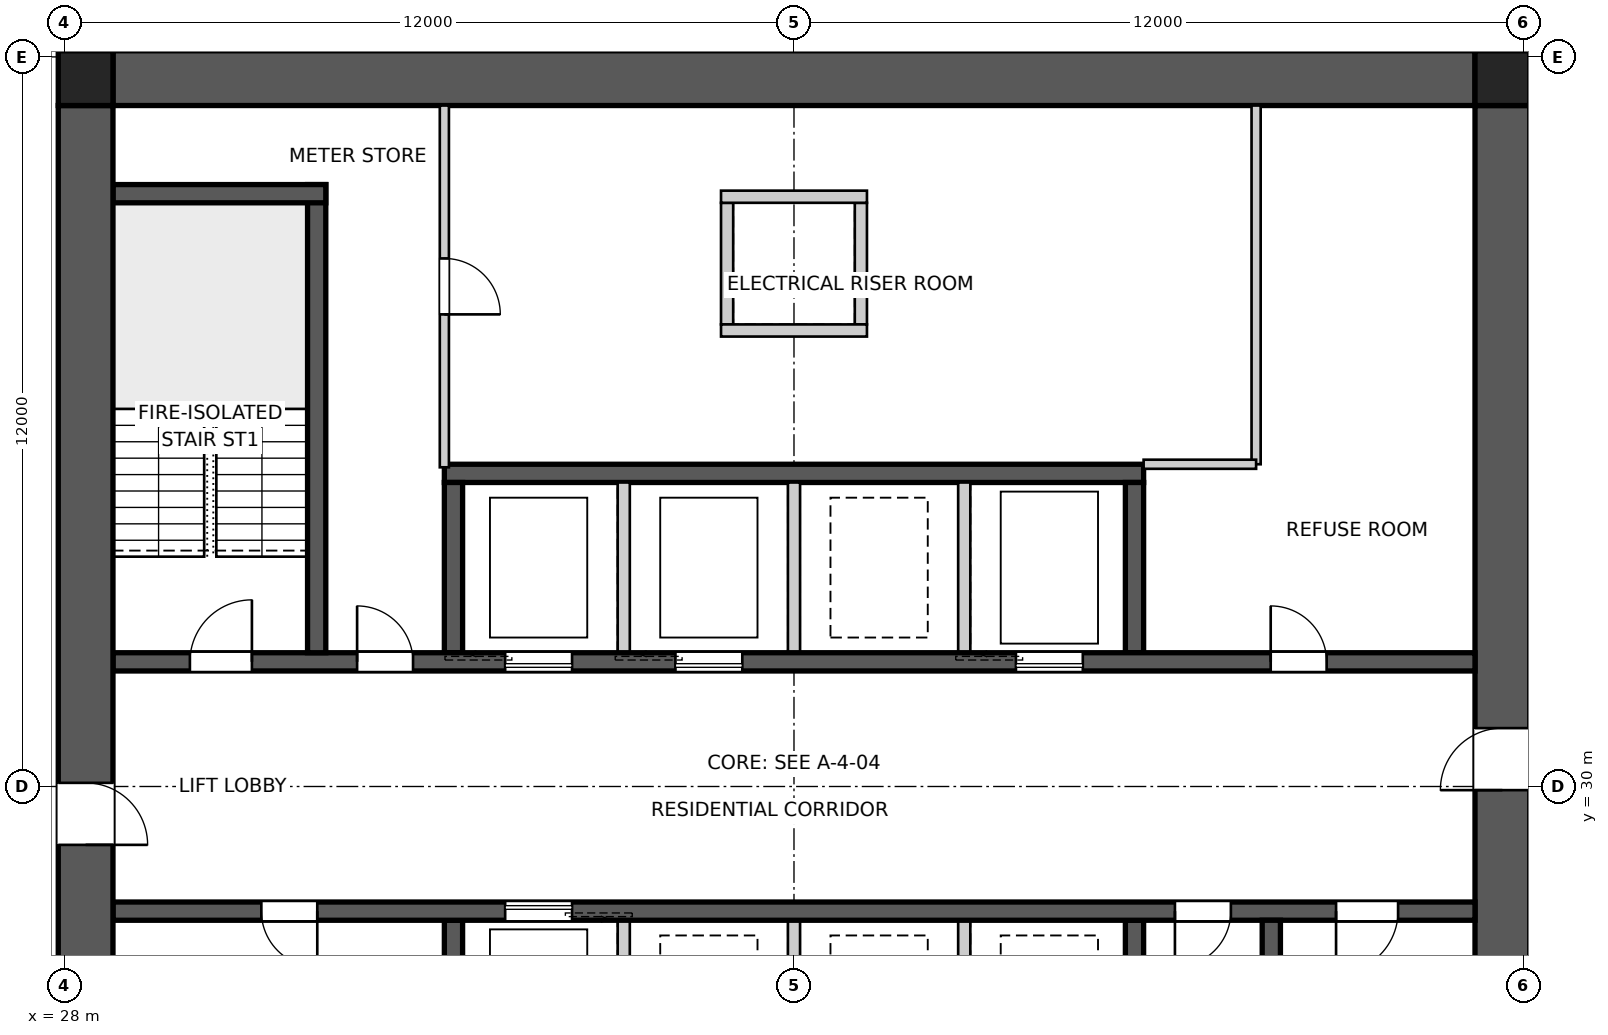
"""IFC4 building model, lengths in metres.
Left out: names, types, materials, properties, quantities, classifications, styles, units other than length and angle.
Written with IfcOpenShell. Run it as: python <this file> out.ifc"""

import sys

from ifc_helpers import new_model, si_unit, direction, frame, frame_2d, origin, origin_2d, place, context, subcontext, project, spatial, polyline, rectangle, outline, extrude, element, fill, save


model = new_model("IFC4")
c1 = context("Model", 3, precision=1e-05, world=origin(), true_north=direction((0.0, 1.0)))
c2 = subcontext(c1, "Body", "Model", "MODEL_VIEW")
j1 = project(units=[si_unit("LENGTHUNIT", "METRE"), si_unit("PLANEANGLEUNIT", "RADIAN")], contexts=[c1])
p1 = place(None, origin())
s1 = spatial("IfcSite", under=j1, at=p1, CompositionType="ELEMENT")
p2 = place(p1, origin())
s2 = spatial("IfcBuilding", under=s1, at=p2, CompositionType="ELEMENT")
p3 = place(p2, frame((0.0, 0.0, 47.2)))
s3 = spatial("IfcBuildingStorey", under=s2, at=p3, CompositionType="ELEMENT", Elevation=47.2)
p4 = place(p3, frame((28.8, 41.65, 0.0), z_axis=(0.0, 0.0, 1.0), x_axis=(1.0, 0.0, 0.0)))
e1 = element("IfcWall", 1, at=p4, inside=s3, PredefinedType="SHEAR", context=c2, shape_type="SweptSolid", body=[
    extrude(outline(polyline([(0.0, -0.45), (22.4, -0.45), (22.4, -0.025), (22.85, -0.025), (22.85, 0.025), (22.4, 0.025), (22.4, 0.45), (0.0, 0.45), (0.0, 0.025), (-0.45, 0.025), (-0.45, -0.025), (0.0, -0.025), (0.0, -0.45)])), origin(), (0.0, 0.0, 1.0), 3.4),
])
p5 = place(p3, frame((51.65, 18.8, 0.0), z_axis=(0.0, 0.0, 1.0), x_axis=(0.0, 1.0, 0.0)))
e2 = element("IfcWall", 2, at=p5, inside=s3, PredefinedType="SHEAR", context=c2, shape_type="SweptSolid", body=[
    extrude(outline(polyline([(0.0, -0.45), (22.4, -0.45), (22.4, -0.025), (22.85, -0.025), (22.85, 0.025), (22.4, 0.025), (22.4, 0.45), (0.0, 0.45), (0.0, 0.025), (-0.45, 0.025), (-0.45, -0.025), (0.0, -0.025), (0.0, -0.45)])), origin(), (0.0, 0.0, 1.0), 3.4),
])
p6 = place(p5, frame((11.14, 0.0, 0.0)))
e3 = element("IfcOpeningElement", 3, at=p6, cuts=e2, PredefinedType="OPENING", context=c2, shape_type="SweptSolid", body=[
    extrude(rectangle(XDim=1.02, YDim=2.4, at=frame_2d((0.51, 1.2))), frame((0.0, 0.46, 0.0), z_axis=(0.0, -1.0, 0.0), x_axis=(1.0, 0.0, 0.0)), (0.0, 0.0, 1.0), 0.92),
])
p7 = place(p3, frame((28.35, 41.2, 0.0), z_axis=(0.0, 0.0, 1.0), x_axis=(0.0, -1.0, 0.0)))
e4 = element("IfcWall", 4, at=p7, inside=s3, PredefinedType="SHEAR", context=c2, shape_type="SweptSolid", body=[
    extrude(outline(polyline([(0.0, -0.45), (22.4, -0.45), (22.4, -0.025), (22.85, -0.025), (22.85, 0.025), (22.4, 0.025), (22.4, 0.45), (0.0, 0.45), (0.0, 0.025), (-0.45, 0.025), (-0.45, -0.025), (0.0, -0.025), (0.0, -0.45)])), origin(), (0.0, 0.0, 1.0), 3.4),
])
p8 = place(p7, frame((11.14, 0.0, 0.0)))
e5 = element("IfcOpeningElement", 5, at=p8, cuts=e4, PredefinedType="OPENING", context=c2, shape_type="SweptSolid", body=[
    extrude(rectangle(XDim=1.02, YDim=2.4, at=frame_2d((0.51, 1.2))), frame((0.0, 0.46, 0.0), z_axis=(0.0, -1.0, 0.0), x_axis=(1.0, 0.0, 0.0)), (0.0, 0.0, 1.0), 0.92),
])
p9 = place(p3, frame((28.8, 32.05, 0.0), z_axis=(0.0, 0.0, 1.0), x_axis=(1.0, 0.0, 0.0)))
e6 = element("IfcWall", 6, at=p9, inside=s3, PredefinedType="SHEAR", context=c2, shape_type="SweptSolid", body=[
    extrude(rectangle(XDim=22.4, YDim=0.3, at=frame_2d((11.2, 0.0))), origin(), (0.0, 0.0, 1.0), 3.4),
])
p10 = place(p9, frame((19.04, 0.0, 0.0)))
e7 = element("IfcOpeningElement", 7, at=p10, cuts=e6, PredefinedType="OPENING", context=c2, shape_type="SweptSolid", body=[
    extrude(rectangle(XDim=0.92, YDim=2.1, at=frame_2d((0.46, 1.05))), frame((0.0, 0.16, 0.0), z_axis=(0.0, -1.0, 0.0), x_axis=(1.0, 0.0, 0.0)), (0.0, 0.0, 1.0), 0.32),
])
p11 = place(p9, frame((1.265, 0.0, 0.0)))
e8 = element("IfcOpeningElement", 8, at=p11, cuts=e6, PredefinedType="OPENING", context=c2, shape_type="SweptSolid", body=[
    extrude(rectangle(XDim=1.02, YDim=2.1, at=frame_2d((0.51, 1.05))), frame((0.0, 0.16, 0.0), z_axis=(0.0, -1.0, 0.0), x_axis=(1.0, 0.0, 0.0)), (0.0, 0.0, 1.0), 0.32),
])
p12 = place(p9, frame((4.015, 0.0, 0.0)))
e9 = element("IfcOpeningElement", 9, at=p12, cuts=e6, PredefinedType="OPENING", context=c2, shape_type="SweptSolid", body=[
    extrude(rectangle(XDim=0.92, YDim=2.1, at=frame_2d((0.46, 1.05))), frame((0.0, 0.16, 0.0), z_axis=(0.0, -1.0, 0.0), x_axis=(1.0, 0.0, 0.0)), (0.0, 0.0, 1.0), 0.32),
])
p13 = place(p9, frame((6.45, 0.0, 0.0)))
e10 = element("IfcOpeningElement", 10, at=p13, cuts=e6, PredefinedType="OPENING", context=c2, shape_type="SweptSolid", body=[
    extrude(rectangle(XDim=1.1, YDim=2.1, at=frame_2d((0.55, 1.05))), frame((0.0, 0.16, 0.0), z_axis=(0.0, -1.0, 0.0), x_axis=(1.0, 0.0, 0.0)), (0.0, 0.0, 1.0), 0.32),
])
p14 = place(p9, frame((9.25, 0.0, 0.0)))
e11 = element("IfcOpeningElement", 11, at=p14, cuts=e6, PredefinedType="OPENING", context=c2, shape_type="SweptSolid", body=[
    extrude(rectangle(XDim=1.1, YDim=2.1, at=frame_2d((0.55, 1.05))), frame((0.0, 0.16, 0.0), z_axis=(0.0, -1.0, 0.0), x_axis=(1.0, 0.0, 0.0)), (0.0, 0.0, 1.0), 0.32),
])
p15 = place(p9, frame((14.85, 0.0, 0.0)))
e12 = element("IfcOpeningElement", 12, at=p15, cuts=e6, PredefinedType="OPENING", context=c2, shape_type="SweptSolid", body=[
    extrude(rectangle(XDim=1.1, YDim=2.1, at=frame_2d((0.55, 1.05))), frame((0.0, 0.16, 0.0), z_axis=(0.0, -1.0, 0.0), x_axis=(1.0, 0.0, 0.0)), (0.0, 0.0, 1.0), 0.32),
])
p16 = place(p3, frame((51.2, 27.95, 0.0), z_axis=(0.0, 0.0, 1.0), x_axis=(-1.0, 0.0, 0.0)))
e13 = element("IfcWall", 13, at=p16, inside=s3, PredefinedType="SHEAR", context=c2, shape_type="SweptSolid", body=[
    extrude(rectangle(XDim=22.4, YDim=0.3, at=frame_2d((11.2, 0.0))), origin(), (0.0, 0.0, 1.0), 3.4),
])
p17 = place(p16, frame((19.04, 0.0, 0.0)))
e14 = element("IfcOpeningElement", 14, at=p17, cuts=e13, PredefinedType="OPENING", context=c2, shape_type="SweptSolid", body=[
    extrude(rectangle(XDim=0.92, YDim=2.1, at=frame_2d((0.46, 1.05))), frame((0.0, 0.16, 0.0), z_axis=(0.0, -1.0, 0.0), x_axis=(1.0, 0.0, 0.0)), (0.0, 0.0, 1.0), 0.32),
])
p18 = place(p16, frame((1.265, 0.0, 0.0)))
e15 = element("IfcOpeningElement", 15, at=p18, cuts=e13, PredefinedType="OPENING", context=c2, shape_type="SweptSolid", body=[
    extrude(rectangle(XDim=1.02, YDim=2.1, at=frame_2d((0.51, 1.05))), frame((0.0, 0.16, 0.0), z_axis=(0.0, -1.0, 0.0), x_axis=(1.0, 0.0, 0.0)), (0.0, 0.0, 1.0), 0.32),
])
p19 = place(p16, frame((4.015, 0.0, 0.0)))
e16 = element("IfcOpeningElement", 16, at=p19, cuts=e13, PredefinedType="OPENING", context=c2, shape_type="SweptSolid", body=[
    extrude(rectangle(XDim=0.92, YDim=2.1, at=frame_2d((0.46, 1.05))), frame((0.0, 0.16, 0.0), z_axis=(0.0, -1.0, 0.0), x_axis=(1.0, 0.0, 0.0)), (0.0, 0.0, 1.0), 0.32),
])
p20 = place(p16, frame((14.85, 0.0, 0.0)))
e17 = element("IfcOpeningElement", 17, at=p20, cuts=e13, PredefinedType="OPENING", context=c2, shape_type="SweptSolid", body=[
    extrude(rectangle(XDim=1.1, YDim=2.1, at=frame_2d((0.55, 1.05))), frame((0.0, 0.16, 0.0), z_axis=(0.0, -1.0, 0.0), x_axis=(1.0, 0.0, 0.0)), (0.0, 0.0, 1.0), 0.32),
])
p21 = place(p3, frame((34.25, 35.15, 0.0), z_axis=(0.0, 0.0, 1.0), x_axis=(1.0, 0.0, 0.0)))
e18 = element("IfcWall", 18, at=p21, inside=s3, PredefinedType="SHEAR", context=c2, shape_type="SweptSolid", body=[
    extrude(rectangle(XDim=11.5, YDim=0.3, at=frame_2d((5.75, 0.0))), origin(), (0.0, 0.0, 1.0), 3.4),
])
for number, where, z_axis, x_axis in (
    (19, (34.4, 32.2, 0.0), (0.0, 0.0, 1.0), (0.0, 1.0, 0.0)),
    (20, (45.6, 27.8, 0.0), (0.0, 0.0, 1.0), (0.0, -1.0, 0.0)),
):
    element("IfcWall", number, at=place(p3, frame(where, z_axis=z_axis, x_axis=x_axis)), inside=s3, PredefinedType="SHEAR", context=c2, shape_type="SweptSolid", body=[
        extrude(rectangle(XDim=2.8, YDim=0.3, at=frame_2d((1.4, 0.0))), origin(), (0.0, 0.0, 1.0), 3.4),
    ])
for number, where, z_axis, x_axis in (
    (21, (37.2, 32.2, 0.0), (0.0, 0.0, 1.0), (0.0, 1.0, 0.0)),
    (22, (42.8, 27.8, 0.0), (0.0, 0.0, 1.0), (0.0, -1.0, 0.0)),
    (23, (40.0, 32.2, 0.0), (0.0, 0.0, 1.0), (0.0, 1.0, 0.0)),
    (24, (40.0, 27.8, 0.0), (0.0, 0.0, 1.0), (0.0, -1.0, 0.0)),
    (25, (42.8, 32.2, 0.0), (0.0, 0.0, 1.0), (0.0, 1.0, 0.0)),
    (26, (37.2, 27.8, 0.0), (0.0, 0.0, 1.0), (0.0, -1.0, 0.0)),
):
    element("IfcWall", number, at=place(p3, frame(where, z_axis=z_axis, x_axis=x_axis)), inside=s3, PredefinedType="SOLIDWALL", context=c2, shape_type="SweptSolid", body=[
        extrude(rectangle(XDim=2.8, YDim=0.2, at=frame_2d((1.4, 0.0))), origin(), (0.0, 0.0, 1.0), 3.4),
    ])
for number, where, z_axis, x_axis in (
    (27, (45.6, 32.2, 0.0), (0.0, 0.0, 1.0), (0.0, 1.0, 0.0)),
    (28, (34.4, 27.8, 0.0), (0.0, 0.0, 1.0), (0.0, -1.0, 0.0)),
):
    element("IfcWall", number, at=place(p3, frame(where, z_axis=z_axis, x_axis=x_axis)), inside=s3, PredefinedType="SHEAR", context=c2, shape_type="SweptSolid", body=[
        extrude(rectangle(XDim=2.8, YDim=0.3, at=frame_2d((1.4, 0.0))), origin(), (0.0, 0.0, 1.0), 3.4),
    ])
p22 = place(p3, frame((32.15, 32.2, 0.0), z_axis=(0.0, 0.0, 1.0), x_axis=(0.0, 1.0, 0.0)))
e29 = element("IfcWall", 29, at=p22, inside=s3, PredefinedType="SHEAR", context=c2, shape_type="SweptSolid", body=[
    extrude(rectangle(XDim=7.7, YDim=0.3, at=frame_2d((3.85, 0.0))), origin(), (0.0, 0.0, 1.0), 3.4),
])
p23 = place(p3, frame((28.8, 39.75, 0.0), z_axis=(0.0, 0.0, 1.0), x_axis=(1.0, 0.0, 0.0)))
e30 = element("IfcWall", 30, at=p23, inside=s3, PredefinedType="SHEAR", context=c2, shape_type="SweptSolid", body=[
    extrude(rectangle(XDim=3.5, YDim=0.3, at=frame_2d((1.75, 0.0))), origin(), (0.0, 0.0, 1.0), 3.4),
])
p24 = place(p3, frame((47.85, 27.8, 0.0), z_axis=(0.0, 0.0, 1.0), x_axis=(0.0, -1.0, 0.0)))
e31 = element("IfcWall", 31, at=p24, inside=s3, PredefinedType="SHEAR", context=c2, shape_type="SweptSolid", body=[
    extrude(rectangle(XDim=7.7, YDim=0.3, at=frame_2d((3.85, 0.0))), origin(), (0.0, 0.0, 1.0), 3.4),
])
for number, where, z_axis, x_axis in (
    (32, (38.9, 37.6, 0.0), (0.0, 0.0, 1.0), (0.0, 1.0, 0.0)),
    (33, (41.1, 37.6, 0.0), (0.0, 0.0, 1.0), (0.0, 1.0, 0.0)),
):
    element("IfcWall", number, at=place(p3, frame(where, z_axis=z_axis, x_axis=x_axis)), inside=s3, PredefinedType="SOLIDWALL", context=c2, shape_type="SweptSolid", body=[
        extrude(rectangle(XDim=2.0, YDim=0.2, at=frame_2d((1.0, 0.0))), origin(), (0.0, 0.0, 1.0), 3.4),
    ])
for number, where, z_axis, x_axis in (
    (34, (38.8, 37.5, 0.0), (0.0, 0.0, 1.0), (1.0, 0.0, 0.0)),
    (35, (38.8, 39.7, 0.0), (0.0, 0.0, 1.0), (1.0, 0.0, 0.0)),
):
    element("IfcWall", number, at=place(p3, frame(where, z_axis=z_axis, x_axis=x_axis)), inside=s3, PredefinedType="SOLIDWALL", context=c2, shape_type="SweptSolid", body=[
        extrude(rectangle(XDim=2.4, YDim=0.2, at=frame_2d((1.2, 0.0))), origin(), (0.0, 0.0, 1.0), 3.4),
    ])
for number, where, z_axis, x_axis in (
    (36, (51.65, 41.65, 0.0), (0.0, 0.0, 1.0), (1.0, 0.0, 0.0)),
    (37, (28.35, 41.65, 0.0), (0.0, 0.0, 1.0), (1.0, 0.0, 0.0)),
):
    element("IfcColumn", number, at=place(p3, frame(where, z_axis=z_axis, x_axis=x_axis)), inside=s3, PredefinedType="COLUMN", context=c2, shape_type="SweptSolid", body=[
        extrude(rectangle(XDim=0.9, YDim=0.9, at=origin_2d()), origin(), (0.0, 0.0, 1.0), 3.4),
    ])
p25 = place(p3, frame((34.25, 41.2, 0.0), z_axis=(0.0, 0.0, 1.0), x_axis=(0.0, -1.0, 0.0)))
e38 = element("IfcWall", 38, at=p25, inside=s3, PredefinedType="SOLIDWALL", context=c2, shape_type="SweptSolid", body=[
    extrude(rectangle(XDim=5.95, YDim=0.15, at=frame_2d((2.975, 0.0))), origin(), (0.0, 0.0, 1.0), 3.25),
])
p26 = place(p25, frame((2.515, 0.0, 0.0)))
e39 = element("IfcOpeningElement", 39, at=p26, cuts=e38, PredefinedType="OPENING", context=c2, shape_type="SweptSolid", body=[
    extrude(rectangle(XDim=0.92, YDim=2.1, at=frame_2d((0.46, 1.05))), frame((0.0, 0.085, 0.0), z_axis=(0.0, -1.0, 0.0), x_axis=(1.0, 0.0, 0.0)), (0.0, 0.0, 1.0), 0.17),
])
p27 = place(p3, frame((47.6, 41.2, 0.0), z_axis=(0.0, 0.0, 1.0), x_axis=(0.0, -1.0, 0.0)))
e40 = element("IfcWall", 40, at=p27, inside=s3, PredefinedType="SOLIDWALL", context=c2, shape_type="SweptSolid", body=[
    extrude(rectangle(XDim=5.9, YDim=0.15, at=frame_2d((2.95, 0.0))), origin(), (0.0, 0.0, 1.0), 3.25),
])
p28 = place(p3, frame((47.6, 35.3, 0.0), z_axis=(0.0, 0.0, 1.0), x_axis=(-1.0, 0.0, 0.0)))
e41 = element("IfcWall", 41, at=p28, inside=s3, PredefinedType="SOLIDWALL", context=c2, shape_type="SweptSolid", body=[
    extrude(rectangle(XDim=1.85, YDim=0.15, at=frame_2d((0.925, 0.0))), origin(), (0.0, 0.0, 1.0), 3.25),
])
p29 = place(p10, origin())
e42 = element("IfcDoor", 42, at=p29, inside=s3, OperationType="SINGLE_SWING_LEFT", PredefinedType="DOOR", context=c2, shape_type="SweptSolid", body=[
    extrude(rectangle(XDim=0.92, YDim=2.1, at=frame_2d((0.46, 1.05))), frame((0.0, 0.025, 0.0), z_axis=(0.0, -1.0, 0.0), x_axis=(1.0, 0.0, 0.0)), (0.0, 0.0, 1.0), 0.05),
])
fill(e7, e42)
p30 = place(p17, origin())
e43 = element("IfcDoor", 43, at=p30, inside=s3, OperationType="SINGLE_SWING_LEFT", PredefinedType="DOOR", context=c2, shape_type="SweptSolid", body=[
    extrude(rectangle(XDim=0.92, YDim=2.1, at=frame_2d((0.46, 1.05))), frame((0.0, 0.025, 0.0), z_axis=(0.0, -1.0, 0.0), x_axis=(1.0, 0.0, 0.0)), (0.0, 0.0, 1.0), 0.05),
])
fill(e14, e43)
p31 = place(p18, origin())
e44 = element("IfcDoor", 44, at=p31, inside=s3, OperationType="SINGLE_SWING_RIGHT", PredefinedType="DOOR", context=c2, shape_type="SweptSolid", body=[
    extrude(rectangle(XDim=1.02, YDim=2.1, at=frame_2d((0.51, 1.05))), frame((0.0, 0.025, 0.0), z_axis=(0.0, -1.0, 0.0), x_axis=(1.0, 0.0, 0.0)), (0.0, 0.0, 1.0), 0.05),
])
fill(e15, e44)
p32 = place(p11, origin())
e45 = element("IfcDoor", 45, at=p32, inside=s3, OperationType="SINGLE_SWING_RIGHT", PredefinedType="DOOR", context=c2, shape_type="SweptSolid", body=[
    extrude(rectangle(XDim=1.02, YDim=2.1, at=frame_2d((0.51, 1.05))), frame((0.0, 0.025, 0.0), z_axis=(0.0, -1.0, 0.0), x_axis=(1.0, 0.0, 0.0)), (0.0, 0.0, 1.0), 0.05),
])
fill(e8, e45)
p33 = place(p12, origin())
e46 = element("IfcDoor", 46, at=p33, inside=s3, OperationType="SINGLE_SWING_LEFT", PredefinedType="DOOR", context=c2, shape_type="SweptSolid", body=[
    extrude(rectangle(XDim=0.92, YDim=2.1, at=frame_2d((0.46, 1.05))), frame((0.0, 0.025, 0.0), z_axis=(0.0, -1.0, 0.0), x_axis=(1.0, 0.0, 0.0)), (0.0, 0.0, 1.0), 0.05),
])
fill(e9, e46)
p34 = place(p19, origin())
e47 = element("IfcDoor", 47, at=p34, inside=s3, OperationType="SINGLE_SWING_RIGHT", PredefinedType="DOOR", context=c2, shape_type="SweptSolid", body=[
    extrude(rectangle(XDim=0.92, YDim=2.1, at=frame_2d((0.46, 1.05))), frame((0.0, 0.025, 0.0), z_axis=(0.0, -1.0, 0.0), x_axis=(1.0, 0.0, 0.0)), (0.0, 0.0, 1.0), 0.05),
])
fill(e16, e47)
p35 = place(p26, origin())
e48 = element("IfcDoor", 48, at=p35, inside=s3, OperationType="SINGLE_SWING_RIGHT", PredefinedType="DOOR", context=c2, shape_type="SweptSolid", body=[
    extrude(rectangle(XDim=0.92, YDim=2.1, at=frame_2d((0.46, 1.05))), frame((0.0, 0.025, 0.0), z_axis=(0.0, -1.0, 0.0), x_axis=(1.0, 0.0, 0.0)), (0.0, 0.0, 1.0), 0.05),
])
fill(e39, e48)
p36 = place(p6, origin())
e49 = element("IfcDoor", 49, at=p36, inside=s3, OperationType="SINGLE_SWING_LEFT", PredefinedType="DOOR", context=c2, shape_type="SweptSolid", body=[
    extrude(rectangle(XDim=1.02, YDim=2.4, at=frame_2d((0.51, 1.2))), frame((0.0, 0.025, 0.0), z_axis=(0.0, -1.0, 0.0), x_axis=(1.0, 0.0, 0.0)), (0.0, 0.0, 1.0), 0.05),
])
fill(e3, e49)
p37 = place(p8, origin())
e50 = element("IfcDoor", 50, at=p37, inside=s3, OperationType="SINGLE_SWING_RIGHT", PredefinedType="DOOR", context=c2, shape_type="SweptSolid", body=[
    extrude(rectangle(XDim=1.02, YDim=2.4, at=frame_2d((0.51, 1.2))), frame((0.0, 0.025, 0.0), z_axis=(0.0, -1.0, 0.0), x_axis=(1.0, 0.0, 0.0)), (0.0, 0.0, 1.0), 0.05),
])
fill(e5, e50)
p38 = place(p13, origin())
e51 = element("IfcDoor", 51, at=p38, inside=s3, OperationType="SLIDING_TO_LEFT", PredefinedType="DOOR", context=c2, shape_type="SweptSolid", body=[
    extrude(rectangle(XDim=1.1, YDim=2.1, at=frame_2d((0.55, 1.05))), frame((0.0, 0.025, 0.0), z_axis=(0.0, -1.0, 0.0), x_axis=(1.0, 0.0, 0.0)), (0.0, 0.0, 1.0), 0.05),
])
fill(e10, e51)
p39 = place(p14, origin())
e52 = element("IfcDoor", 52, at=p39, inside=s3, OperationType="SLIDING_TO_LEFT", PredefinedType="DOOR", context=c2, shape_type="SweptSolid", body=[
    extrude(rectangle(XDim=1.1, YDim=2.1, at=frame_2d((0.55, 1.05))), frame((0.0, 0.025, 0.0), z_axis=(0.0, -1.0, 0.0), x_axis=(1.0, 0.0, 0.0)), (0.0, 0.0, 1.0), 0.05),
])
fill(e11, e52)
p40 = place(p15, origin())
e53 = element("IfcDoor", 53, at=p40, inside=s3, OperationType="SLIDING_TO_LEFT", PredefinedType="DOOR", context=c2, shape_type="SweptSolid", body=[
    extrude(rectangle(XDim=1.1, YDim=2.1, at=frame_2d((0.55, 1.05))), frame((0.0, 0.025, 0.0), z_axis=(0.0, -1.0, 0.0), x_axis=(1.0, 0.0, 0.0)), (0.0, 0.0, 1.0), 0.05),
])
fill(e12, e53)
p41 = place(p20, origin())
e54 = element("IfcDoor", 54, at=p41, inside=s3, OperationType="SLIDING_TO_LEFT", PredefinedType="DOOR", context=c2, shape_type="SweptSolid", body=[
    extrude(rectangle(XDim=1.1, YDim=2.1, at=frame_2d((0.55, 1.05))), frame((0.0, 0.025, 0.0), z_axis=(0.0, -1.0, 0.0), x_axis=(1.0, 0.0, 0.0)), (0.0, 0.0, 1.0), 0.05),
])
fill(e17, e54)
save(model, sys.argv[1])
